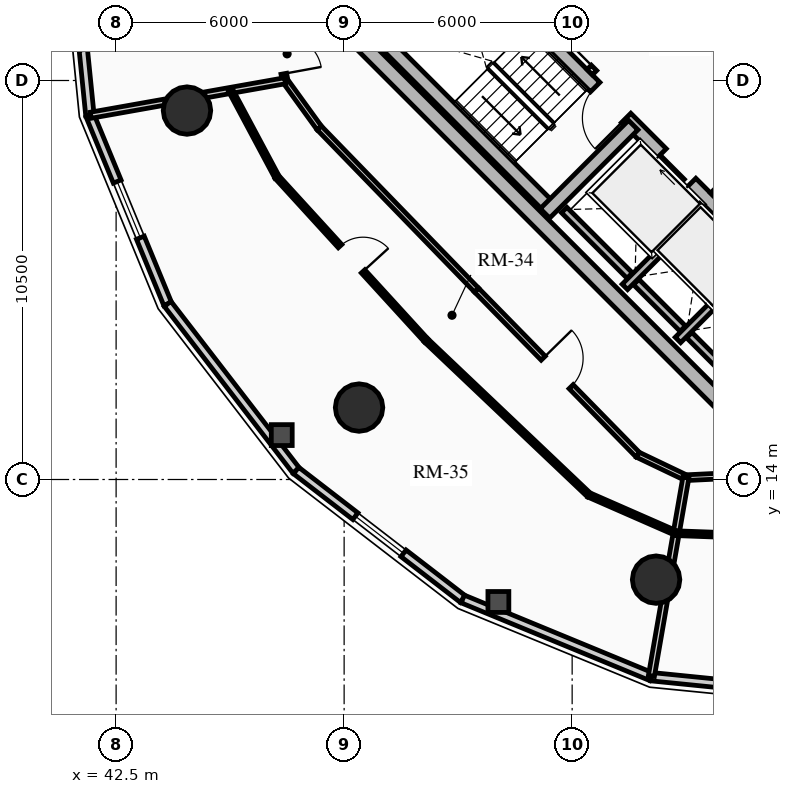
"""IFC4 building model, lengths in metres.
Left out: names, types, materials, properties, quantities, classifications, styles, units other than length and angle.
Written with IfcOpenShell. Run it as: python <this file> out.ifc"""

import sys

from ifc_helpers import new_model, si_unit, direction, frame, frame_2d, origin, origin_2d, place, context, subcontext, project, spatial, rectangle, circle, extrude, source, transform, mapped, element, fill, save


model = new_model("IFC4")
c1 = context("Model", 3, precision=1e-05, world=origin(), true_north=direction((0.0, 1.0)))
c2 = subcontext(c1, "Body", "Model", "MODEL_VIEW")
j1 = project(units=[si_unit("LENGTHUNIT", "METRE"), si_unit("PLANEANGLEUNIT", "RADIAN")], contexts=[c1])
p1 = place(None, origin())
s1 = spatial("IfcSite", under=j1, at=p1, CompositionType="ELEMENT")
p2 = place(p1, origin())
s2 = spatial("IfcBuilding", under=s1, at=p2, CompositionType="ELEMENT")
p3 = place(p2, frame((0.0, 0.0, 166.15)))
s3 = spatial("IfcBuildingStorey", under=s2, at=p3, CompositionType="ELEMENT", Elevation=166.15)
for number, where, z_axis, x_axis in (
    (1, (58.702, 15.732, 0.0), (0.0, 0.0, 1.0), (-0.707, 0.707, 0.0)),
    (2, (66.268, 23.298, 0.0), (0.0, 0.0, 1.0), (-0.707, 0.707, 0.0)),
):
    element("IfcWall", number, at=place(p3, frame(where, z_axis=z_axis, x_axis=x_axis)), inside=s3, PredefinedType="SHEAR", context=c2, shape_type="SweptSolid", body=[
        extrude(rectangle(XDim=14.1, YDim=0.4, at=frame_2d((7.05, 0.0))), origin(), (0.0, 0.0, 1.0), 2.91),
    ])
p4 = place(p3, frame((61.06, 18.373, 0.0), z_axis=(0.0, 0.0, 1.0), x_axis=(-0.707106781187, 0.707106781187, 0.0)))
e3 = element("IfcWall", 3, at=p4, inside=s3, PredefinedType="SHEAR", context=c2, shape_type="SweptSolid", body=[
    extrude(rectangle(XDim=13.7, YDim=0.35, at=frame_2d((6.85, 0.0))), origin(), (0.0, 0.0, 1.0), 2.91),
])
m1 = source(origin(), c2, "Body", "SweptSolid", [
    extrude(rectangle(XDim=1.1, YDim=2.015, at=frame_2d((0.55, 1.007))), frame((0.0, 0.185, 0.0), z_axis=(0.0, -1.0, 0.0), x_axis=(1.0, 0.0, 0.0)), (0.0, 0.0, 1.0), 0.37),
])
p5 = place(p4, frame((4.85, 0.0, 0.0)))
e4 = element("IfcOpeningElement", 4, at=p5, cuts=e3, PredefinedType="OPENING", context=c2, shape_type="MappedRepresentation", body=[
    mapped(m1, transform((0.0, 0.0, 0.0), x_axis=(1.0, 0.0, 0.0), y_axis=(0.0, 1.0, 0.0), z_axis=(0.0, 0.0, 1.0), scale=1.0)),
])
p6 = place(p4, frame((0.625, 0.0, 0.0)))
e5 = element("IfcOpeningElement", 5, at=p6, cuts=e3, PredefinedType="OPENING", context=c2, shape_type="MappedRepresentation", body=[
    mapped(m1, transform((0.0, 0.0, 0.0), x_axis=(1.0, 0.0, 0.0), y_axis=(0.0, 1.0, 0.0), z_axis=(0.0, 0.0, 1.0), scale=1.0)),
])
p7 = place(p4, frame((2.625, 0.0, 0.0)))
e6 = element("IfcOpeningElement", 6, at=p7, cuts=e3, PredefinedType="OPENING", context=c2, shape_type="MappedRepresentation", body=[
    mapped(m1, transform((0.0, 0.0, 0.0), x_axis=(1.0, 0.0, 0.0), y_axis=(0.0, 1.0, 0.0), z_axis=(0.0, 0.0, 1.0), scale=1.0)),
])
m2 = source(origin(), c2, "Body", "SweptSolid", [
    extrude(rectangle(XDim=1.15, YDim=2.02, at=frame_2d((0.575, 1.01))), frame((0.0, 0.185, 0.0), z_axis=(0.0, -1.0, 0.0), x_axis=(1.0, 0.0, 0.0)), (0.0, 0.0, 1.0), 0.37),
])
p8 = place(p4, frame((7.27, 0.0, 0.0)))
e7 = element("IfcOpeningElement", 7, at=p8, cuts=e3, PredefinedType="OPENING", context=c2, shape_type="MappedRepresentation", body=[
    mapped(m2, transform((0.0, 0.0, 0.0), x_axis=(1.0, 0.0, 0.0), y_axis=(0.0, 1.0, 0.0), z_axis=(0.0, 0.0, 1.0), scale=1.0)),
])
p9 = place(p3, frame((63.627, 20.94, 0.0), z_axis=(0.0, 0.0, 1.0), x_axis=(-0.707119496762, 0.707094065383, 0.0)))
e8 = element("IfcWall", 8, at=p9, inside=s3, PredefinedType="SHEAR", context=c2, shape_type="SweptSolid", body=[
    extrude(rectangle(XDim=9.6, YDim=0.35, at=frame_2d((4.8, 0.0))), origin(), (0.0, 0.0, 1.0), 2.91),
])
p10 = place(p9, frame((5.28, 0.0, 0.0)))
e9 = element("IfcOpeningElement", 9, at=p10, cuts=e8, PredefinedType="OPENING", context=c2, shape_type="MappedRepresentation", body=[
    mapped(m2, transform((0.0, 0.0, 0.0), x_axis=(1.0, 0.0, 0.0), y_axis=(0.0, 1.0, 0.0), z_axis=(0.0, 0.0, 1.0), scale=1.0)),
])
p11 = place(p3, frame((53.922, 21.141, 0.0), z_axis=(0.0, 0.0, 1.0), x_axis=(-0.707106781187, 0.707106781187, 0.0)))
e10 = element("IfcWall", 10, at=p11, inside=s3, PredefinedType="SHEAR", context=c2, shape_type="SweptSolid", body=[
    extrude(rectangle(XDim=6.695, YDim=0.35, at=frame_2d((3.348, 0.0))), origin(), (0.0, 0.0, 1.0), 2.91),
])
p12 = place(p3, frame((53.784, 21.003, 0.0), z_axis=(0.0, 0.0, 1.0), x_axis=(0.707106781187, 0.707106781187, 0.0)))
e11 = element("IfcWall", 11, at=p12, inside=s3, PredefinedType="SHEAR", context=c2, shape_type="SweptSolid", body=[
    extrude(rectangle(XDim=3.285, YDim=0.35, at=frame_2d((1.643, 0.0))), origin(), (0.0, 0.0, 1.0), 2.91),
])
for number, where, z_axis, x_axis in (
    (12, (44.365, 23.709, 0.0), (0.0, 0.0, 1.0), (1.0, 0.0, 0.0)),
    (13, (48.893, 15.893, 0.0), (0.0, 0.0, 1.0), (1.0, 0.0, 0.0)),
    (14, (56.709, 11.365, 0.0), (0.0, 0.0, 1.0), (1.0, 0.0, 0.0)),
):
    element("IfcColumn", number, at=place(p3, frame(where, z_axis=z_axis, x_axis=x_axis)), inside=s3, PredefinedType="USERDEFINED", context=c2, shape_type="SweptSolid", body=[
        extrude(circle(Radius=0.625, at=origin_2d()), origin(), (0.0, 0.0, 1.0), 2.91),
    ])
p13 = place(p3, frame((41.811, 23.582, 0.0), z_axis=(0.0, 0.0, 1.0), x_axis=(-0.100279889424, 0.994959267396, 0.0)))
e15 = element("IfcWall", 15, at=p13, inside=s3, PredefinedType="SOLIDWALL", context=c2, shape_type="SweptSolid", body=[
    extrude(rectangle(XDim=5.076, YDim=0.22, at=frame_2d((2.538, 0.0))), origin(), (0.0, 0.0, 1.0), 2.675),
])
m3 = source(origin(), c2, "Body", "SweptSolid", [
    extrude(rectangle(XDim=1.6, YDim=1.3, at=frame_2d((0.8, 0.65))), frame((0.0, 0.12, 0.0), z_axis=(0.0, -1.0, 0.0), x_axis=(1.0, 0.0, 0.0)), (0.0, 0.0, 1.0), 0.24),
])
p14 = place(p13, frame((1.738, 0.0, 0.65)))
e16 = element("IfcOpeningElement", 16, at=p14, cuts=e15, PredefinedType="OPENING", context=c2, shape_type="MappedRepresentation", body=[
    mapped(m3, transform((0.0, 0.0, 0.0), x_axis=(1.0, 0.0, 0.0), y_axis=(0.0, 1.0, 0.0), z_axis=(0.0, 0.0, 1.0), scale=1.0)),
])
p15 = place(p3, frame((43.856, 18.622, 0.0), z_axis=(0.0, 0.0, 1.0), x_axis=(-0.38111364655, 0.924528197738, 0.0)))
e17 = element("IfcWall", 17, at=p15, inside=s3, PredefinedType="SOLIDWALL", context=c2, shape_type="SweptSolid", body=[
    extrude(rectangle(XDim=5.366, YDim=0.22, at=frame_2d((2.683, 0.0))), origin(), (0.0, 0.0, 1.0), 2.675),
])
p16 = place(p15, frame((1.883, 0.0, 0.65)))
e18 = element("IfcOpeningElement", 18, at=p16, cuts=e17, PredefinedType="OPENING", context=c2, shape_type="MappedRepresentation", body=[
    mapped(m3, transform((0.0, 0.0, 0.0), x_axis=(1.0, 0.0, 0.0), y_axis=(0.0, 1.0, 0.0), z_axis=(0.0, 0.0, 1.0), scale=1.0)),
])
p17 = place(p3, frame((47.236, 14.236, 0.0), z_axis=(0.0, 0.0, 1.0), x_axis=(-0.610543584779, 0.791982658323, 0.0)))
e19 = element("IfcWall", 19, at=p17, inside=s3, PredefinedType="SOLIDWALL", context=c2, shape_type="SweptSolid", body=[
    extrude(rectangle(XDim=5.537, YDim=0.22, at=frame_2d((2.769, 0.0))), origin(), (0.0, 0.0, 1.0), 2.675),
])
p18 = place(p3, frame((51.622, 10.856, 0.0), z_axis=(0.0, 0.0, 1.0), x_axis=(-0.791982658323, 0.610543584779, 0.0)))
e20 = element("IfcWall", 20, at=p18, inside=s3, PredefinedType="SOLIDWALL", context=c2, shape_type="SweptSolid", body=[
    extrude(rectangle(XDim=5.537, YDim=0.22, at=frame_2d((2.769, 0.0))), origin(), (0.0, 0.0, 1.0), 2.675),
])
p19 = place(p18, frame((1.968, 0.0, 0.65)))
e21 = element("IfcOpeningElement", 21, at=p19, cuts=e20, PredefinedType="OPENING", context=c2, shape_type="MappedRepresentation", body=[
    mapped(m3, transform((0.0, 0.0, 0.0), x_axis=(1.0, 0.0, 0.0), y_axis=(0.0, 1.0, 0.0), z_axis=(0.0, 0.0, 1.0), scale=1.0)),
])
p20 = place(p3, frame((56.582, 8.811, 0.0), z_axis=(0.0, 0.0, 1.0), x_axis=(-0.924528197738, 0.38111364655, 0.0)))
e22 = element("IfcWall", 22, at=p20, inside=s3, PredefinedType="SOLIDWALL", context=c2, shape_type="SweptSolid", body=[
    extrude(rectangle(XDim=5.366, YDim=0.22, at=frame_2d((2.683, 0.0))), origin(), (0.0, 0.0, 1.0), 2.675),
])
p21 = place(p3, frame((61.633, 8.302, 0.0), z_axis=(0.0, 0.0, 1.0), x_axis=(-0.994959267396, 0.100279889424, 0.0)))
e23 = element("IfcWall", 23, at=p21, inside=s3, PredefinedType="SOLIDWALL", context=c2, shape_type="SweptSolid", body=[
    extrude(rectangle(XDim=5.076, YDim=0.22, at=frame_2d((2.538, 0.0))), origin(), (0.0, 0.0, 1.0), 2.675),
])
p22 = place(p21, frame((1.738, 0.0, 0.65)))
e24 = element("IfcOpeningElement", 24, at=p22, cuts=e23, PredefinedType="OPENING", context=c2, shape_type="MappedRepresentation", body=[
    mapped(m3, transform((0.0, 0.0, 0.0), x_axis=(1.0, 0.0, 0.0), y_axis=(0.0, 1.0, 0.0), z_axis=(0.0, 0.0, 1.0), scale=1.0)),
])
p23 = place(p3, frame((55.888, 19.069, 0.0), z_axis=(0.0, 0.0, 1.0), x_axis=(0.707106781187, 0.707106781187, 0.0)))
e25 = element("IfcWall", 25, at=p23, inside=s3, PredefinedType="SHEAR", context=c2, shape_type="SweptSolid", body=[
    extrude(rectangle(XDim=2.97, YDim=0.2, at=frame_2d((1.485, 0.0))), origin(), (0.0, 0.0, 1.0), 2.91),
])
p24 = place(p3, frame((56.015, 19.366, 0.0), z_axis=(0.0, 0.0, 1.0), x_axis=(-0.707106781187, 0.707106781187, 0.0)))
e26 = element("IfcWall", 26, at=p24, inside=s3, PredefinedType="SHEAR", context=c2, shape_type="SweptSolid", body=[
    extrude(rectangle(XDim=2.44, YDim=0.2, at=frame_2d((1.22, 0.0))), origin(), (0.0, 0.0, 1.0), 2.91),
])
p25 = place(p3, frame((57.284, 17.673, 0.0), z_axis=(0.0, 0.0, 1.0), x_axis=(0.707147878904, 0.70706568108, 0.0)))
e27 = element("IfcWall", 27, at=p25, inside=s3, PredefinedType="SHEAR", context=c2, shape_type="SweptSolid", body=[
    extrude(rectangle(XDim=2.97, YDim=0.2, at=frame_2d((1.485, 0.0))), origin(), (0.0, 0.0, 1.0), 2.91),
])
p26 = place(p3, frame((57.412, 17.97, 0.0), z_axis=(0.0, 0.0, 1.0), x_axis=(-0.707106781187, 0.707106781187, 0.0)))
e28 = element("IfcWall", 28, at=p26, inside=s3, PredefinedType="SHEAR", context=c2, shape_type="SweptSolid", body=[
    extrude(rectangle(XDim=1.735, YDim=0.2, at=frame_2d((0.867, 0.0))), origin(), (0.0, 0.0, 1.0), 2.91),
])
p27 = place(p3, frame((58.737, 16.644, 0.0), z_axis=(0.0, 0.0, 1.0), x_axis=(-0.707032117043, 0.707181437447, 0.0)))
e29 = element("IfcWall", 29, at=p27, inside=s3, PredefinedType="SHEAR", context=c2, shape_type="SweptSolid", body=[
    extrude(rectangle(XDim=1.635, YDim=0.2, at=frame_2d((0.817, 0.0))), origin(), (0.0, 0.0, 1.0), 2.91),
])
p28 = place(p3, frame((58.214, 21.467, 0.0), z_axis=(0.0, 0.0, 1.0), x_axis=(0.707106781187, 0.707106781187, 0.0)))
e30 = element("IfcWall", 30, at=p28, inside=s3, PredefinedType="PARTITIONING", context=c2, shape_type="SweptSolid", body=[
    extrude(rectangle(XDim=3.28, YDim=0.2, at=frame_2d((1.64, 0.0))), origin(), (0.0, 0.0, 1.0), 2.675),
])
m4 = source(origin(), c2, "Body", "SweptSolid", [
    extrude(rectangle(XDim=1.5, YDim=2.02, at=frame_2d((0.75, 1.01))), frame((0.0, 0.11, 0.0), z_axis=(0.0, -1.0, 0.0), x_axis=(1.0, 0.0, 0.0)), (0.0, 0.0, 1.0), 0.22),
])
p29 = place(p28, frame((1.55, 0.0, 0.0)))
e31 = element("IfcOpeningElement", 31, at=p29, cuts=e30, PredefinedType="OPENING", context=c2, shape_type="MappedRepresentation", body=[
    mapped(m4, transform((0.0, 0.0, 0.0), x_axis=(1.0, 0.0, 0.0), y_axis=(0.0, 1.0, 0.0), z_axis=(0.0, 0.0, 1.0), scale=1.0)),
])
p30 = place(p3, frame((54.961, 24.719, 0.0), z_axis=(0.0, 0.0, 1.0), x_axis=(0.707106781187, 0.707106781187, 0.0)))
e32 = element("IfcWall", 32, at=p30, inside=s3, PredefinedType="PARTITIONING", context=c2, shape_type="SweptSolid", body=[
    extrude(rectangle(XDim=3.28, YDim=0.2, at=frame_2d((1.64, 0.0))), origin(), (0.0, 0.0, 1.0), 2.675),
])
m5 = source(origin(), c2, "Body", "SweptSolid", [
    extrude(rectangle(XDim=0.9, YDim=2.005, at=frame_2d((0.45, 1.002))), frame((0.0, 0.11, 0.0), z_axis=(0.0, -1.0, 0.0), x_axis=(1.0, 0.0, 0.0)), (0.0, 0.0, 1.0), 0.22),
])
p31 = place(p30, frame((0.16, 0.0, 0.0)))
e33 = element("IfcOpeningElement", 33, at=p31, cuts=e32, PredefinedType="OPENING", context=c2, shape_type="MappedRepresentation", body=[
    mapped(m5, transform((0.0, 0.0, 0.0), x_axis=(1.0, 0.0, 0.0), y_axis=(0.0, 1.0, 0.0), z_axis=(0.0, 0.0, 1.0), scale=1.0)),
])
p32 = place(p3, frame((46.699, 25.843, 0.0), z_axis=(0.0, 0.0, 1.0), x_axis=(0.180451258011, -0.983583928032, 0.0)))
e34 = element("IfcWall", 34, at=p32, inside=s3, PredefinedType="PARTITIONING", context=c2, shape_type="SweptSolid", body=[
    extrude(rectangle(XDim=1.372, YDim=0.15, at=frame_2d((0.686, 0.0))), origin(), (0.0, 0.0, 1.0), 2.245),
])
m6 = source(origin(), c2, "Body", "SweptSolid", [
    extrude(rectangle(XDim=1.0, YDim=2.015, at=frame_2d((0.5, 1.007))), frame((0.0, 0.085, 0.0), z_axis=(0.0, -1.0, 0.0), x_axis=(1.0, 0.0, 0.0)), (0.0, 0.0, 1.0), 0.17),
])
p33 = place(p32, frame((0.186, 0.0, 0.0)))
e35 = element("IfcOpeningElement", 35, at=p33, cuts=e34, PredefinedType="OPENING", context=c2, shape_type="MappedRepresentation", body=[
    mapped(m6, transform((0.0, 0.0, 0.0), x_axis=(1.0, 0.0, 0.0), y_axis=(0.0, 1.0, 0.0), z_axis=(0.0, 0.0, 1.0), scale=1.0)),
])
p34 = place(p3, frame((46.946, 24.494, 0.0), z_axis=(0.0, 0.0, 1.0), x_axis=(0.586340262528, -0.810064871809, 0.0)))
e36 = element("IfcWall", 36, at=p34, inside=s3, PredefinedType="PARTITIONING", context=c2, shape_type="SweptSolid", body=[
    extrude(rectangle(XDim=1.531, YDim=0.15, at=frame_2d((0.766, 0.0))), origin(), (0.0, 0.0, 1.0), 2.245),
])
p35 = place(p3, frame((47.844, 23.253, 0.0), z_axis=(0.0, 0.0, 1.0), x_axis=(0.696248411352, -0.717800912293, 0.0)))
e37 = element("IfcWall", 37, at=p35, inside=s3, PredefinedType="PARTITIONING", context=c2, shape_type="SweptSolid", body=[
    extrude(rectangle(XDim=5.947, YDim=0.15, at=frame_2d((2.974, 0.0))), origin(), (0.0, 0.0, 1.0), 2.675),
])
p36 = place(p3, frame((51.985, 18.985, 0.0), z_axis=(0.0, 0.0, 1.0), x_axis=(0.699619654291, -0.714515457726, 0.0)))
e38 = element("IfcWall", 38, at=p36, inside=s3, PredefinedType="PARTITIONING", context=c2, shape_type="SweptSolid", body=[
    extrude(rectangle(XDim=6.064, YDim=0.15, at=frame_2d((3.032, 0.0))), origin(), (0.0, 0.0, 1.0), 2.245),
])
m7 = source(origin(), c2, "Body", "SweptSolid", [
    extrude(rectangle(XDim=1.05, YDim=2.015, at=frame_2d((0.525, 1.007))), frame((0.0, 0.085, 0.0), z_axis=(0.0, -1.0, 0.0), x_axis=(1.0, 0.0, 0.0)), (0.0, 0.0, 1.0), 0.17),
])
p37 = place(p36, frame((2.507, 0.0, 0.0)))
e39 = element("IfcOpeningElement", 39, at=p37, cuts=e38, PredefinedType="OPENING", context=c2, shape_type="MappedRepresentation", body=[
    mapped(m7, transform((0.0, 0.0, 0.0), x_axis=(1.0, 0.0, 0.0), y_axis=(0.0, 1.0, 0.0), z_axis=(0.0, 0.0, 1.0), scale=1.0)),
])
p38 = place(p3, frame((56.227, 14.652, 0.0), z_axis=(0.0, 0.0, 1.0), x_axis=(0.902364039563, -0.430974639745, 0.0)))
e40 = element("IfcWall", 40, at=p38, inside=s3, PredefinedType="PARTITIONING", context=c2, shape_type="SweptSolid", body=[
    extrude(rectangle(XDim=1.401, YDim=0.15, at=frame_2d((0.701, 0.0))), origin(), (0.0, 0.0, 1.0), 2.245),
])
p39 = place(p3, frame((57.492, 14.048, 0.0), z_axis=(0.0, 0.0, 1.0), x_axis=(0.99885011351, 0.047942160364, 0.0)))
e41 = element("IfcWall", 41, at=p39, inside=s3, PredefinedType="PARTITIONING", context=c2, shape_type="SweptSolid", body=[
    extrude(rectangle(XDim=1.477, YDim=0.15, at=frame_2d((0.738, 0.0))), origin(), (0.0, 0.0, 1.0), 2.245),
])
p40 = place(p3, frame((46.946, 24.494, 0.0), z_axis=(0.0, 0.0, 1.0), x_axis=(-0.984604227647, -0.174798497988, 0.0)))
e42 = element("IfcWall", 42, at=p40, inside=s3, PredefinedType="PARTITIONING", context=c2, shape_type="SweptSolid", body=[
    extrude(rectangle(XDim=5.196, YDim=0.16, at=frame_2d((2.598, 0.0))), origin(), (0.0, 0.0, 1.0), 2.245),
])
p41 = place(p3, frame((57.492, 14.048, 0.0), z_axis=(0.0, 0.0, 1.0), x_axis=(-0.171191349619, -0.985237799628, 0.0)))
e43 = element("IfcWall", 43, at=p41, inside=s3, PredefinedType="PARTITIONING", context=c2, shape_type="SweptSolid", body=[
    extrude(rectangle(XDim=5.295, YDim=0.16, at=frame_2d((2.647, 0.0))), origin(), (0.0, 0.0, 1.0), 2.245),
])
p42 = place(p3, frame((45.514, 24.239, 0.0), z_axis=(0.0, 0.0, 1.0), x_axis=(0.471225296528, -0.882012879674, 0.0)))
e44 = element("IfcWall", 44, at=p42, inside=s3, PredefinedType="PARTITIONING", context=c2, shape_type="SweptSolid", body=[
    extrude(rectangle(XDim=2.585, YDim=0.125, at=frame_2d((1.292, 0.0))), origin(), (0.0, 0.0, 1.0), 2.245),
])
p43 = place(p3, frame((46.732, 21.959, 0.0), z_axis=(0.0, 0.0, 1.0), x_axis=(0.674328014222, -0.738431939474, 0.0)))
e45 = element("IfcWall", 45, at=p43, inside=s3, PredefinedType="PARTITIONING", context=c2, shape_type="SweptSolid", body=[
    extrude(rectangle(XDim=5.823, YDim=0.125, at=frame_2d((2.912, 0.0))), origin(), (0.0, 0.0, 1.0), 2.675),
])
m8 = source(origin(), c2, "Body", "SweptSolid", [
    extrude(rectangle(XDim=0.9, YDim=2.005, at=frame_2d((0.45, 1.002))), frame((0.0, 0.073, 0.0), z_axis=(0.0, -1.0, 0.0), x_axis=(1.0, 0.0, 0.0)), (0.0, 0.0, 1.0), 0.145),
])
p44 = place(p43, frame((2.462, 0.0, 0.0)))
e46 = element("IfcOpeningElement", 46, at=p44, cuts=e45, PredefinedType="OPENING", context=c2, shape_type="MappedRepresentation", body=[
    mapped(m8, transform((0.0, 0.0, 0.0), x_axis=(1.0, 0.0, 0.0), y_axis=(0.0, 1.0, 0.0), z_axis=(0.0, 0.0, 1.0), scale=1.0)),
])
p45 = place(p3, frame((50.659, 17.659, 0.0), z_axis=(0.0, 0.0, 1.0), x_axis=(0.72516873678, -0.688571204159, 0.0)))
e47 = element("IfcWall", 47, at=p45, inside=s3, PredefinedType="PARTITIONING", context=c2, shape_type="SweptSolid", body=[
    extrude(rectangle(XDim=5.904, YDim=0.125, at=frame_2d((2.952, 0.0))), origin(), (0.0, 0.0, 1.0), 2.245),
])
p46 = place(p3, frame((54.94, 13.594, 0.0), z_axis=(0.0, 0.0, 1.0), x_axis=(0.915898070967, -0.401410916143, 0.0)))
e48 = element("IfcWall", 48, at=p46, inside=s3, PredefinedType="PARTITIONING", context=c2, shape_type="SweptSolid", body=[
    extrude(rectangle(XDim=2.509, YDim=0.125, at=frame_2d((1.254, 0.0))), origin(), (0.0, 0.0, 1.0), 2.245),
])
p47 = place(p3, frame((57.238, 12.587, 0.0), z_axis=(0.0, 0.0, 1.0), x_axis=(0.999316318576, -0.036971548882, 0.0)))
e49 = element("IfcWall", 49, at=p47, inside=s3, PredefinedType="PARTITIONING", context=c2, shape_type="SweptSolid", body=[
    extrude(rectangle(XDim=2.476, YDim=0.125, at=frame_2d((1.238, 0.0))), origin(), (0.0, 0.0, 1.0), 2.245),
])
m9 = source(origin(), c2, "Body", "SweptSolid", [
    extrude(rectangle(XDim=1.6, YDim=1.3, at=frame_2d((0.8, 0.65))), frame((0.0, 0.03, 0.0), z_axis=(0.0, -1.0, 0.0), x_axis=(1.0, 0.0, 0.0)), (0.0, 0.0, 1.0), 0.06),
])
p48 = place(p16, origin())
e50 = element("IfcWindow", 50, at=p48, inside=s3, PartitioningType="SINGLE_PANEL", PredefinedType="WINDOW", context=c2, shape_type="MappedRepresentation", body=[
    mapped(m9, transform((0.0, 0.0, 0.0), x_axis=(1.0, 0.0, 0.0), y_axis=(0.0, 1.0, 0.0), z_axis=(0.0, 0.0, 1.0), scale=1.0)),
])
fill(e18, e50)
p49 = place(p19, origin())
e51 = element("IfcWindow", 51, at=p49, inside=s3, PartitioningType="SINGLE_PANEL", PredefinedType="WINDOW", context=c2, shape_type="MappedRepresentation", body=[
    mapped(m9, transform((0.0, 0.0, 0.0), x_axis=(1.0, 0.0, 0.0), y_axis=(0.0, 1.0, 0.0), z_axis=(0.0, 0.0, 1.0), scale=1.0)),
])
fill(e21, e51)
m10 = source(origin(), c2, "Body", "SweptSolid", [
    extrude(rectangle(XDim=1.1, YDim=2.015, at=frame_2d((0.55, 1.007))), frame((0.0, 0.025, 0.0), z_axis=(0.0, -1.0, 0.0), x_axis=(1.0, 0.0, 0.0)), (0.0, 0.0, 1.0), 0.05),
])
p50 = place(p5, origin())
e52 = element("IfcDoor", 52, at=p50, inside=s3, OperationType="SLIDING_TO_RIGHT", PredefinedType="DOOR", context=c2, shape_type="MappedRepresentation", body=[
    mapped(m10, transform((0.0, 0.0, 0.0), x_axis=(1.0, 0.0, 0.0), y_axis=(0.0, 1.0, 0.0), z_axis=(0.0, 0.0, 1.0), scale=1.0)),
])
fill(e4, e52)
m11 = source(origin(), c2, "Body", "SweptSolid", [
    extrude(rectangle(XDim=1.15, YDim=2.02, at=frame_2d((0.575, 1.01))), frame((0.0, 0.025, 0.0), z_axis=(0.0, -1.0, 0.0), x_axis=(1.0, 0.0, 0.0)), (0.0, 0.0, 1.0), 0.05),
])
p51 = place(p8, origin())
e53 = element("IfcDoor", 53, at=p51, inside=s3, OperationType="SINGLE_SWING_LEFT", PredefinedType="DOOR", context=c2, shape_type="MappedRepresentation", body=[
    mapped(m11, transform((0.0, 0.0, 0.0), x_axis=(1.0, 0.0, 0.0), y_axis=(0.0, 1.0, 0.0), z_axis=(0.0, 0.0, 1.0), scale=1.0)),
])
fill(e7, e53)
m12 = source(origin(), c2, "Body", "SweptSolid", [
    extrude(rectangle(XDim=0.9, YDim=2.005, at=frame_2d((0.45, 1.002))), frame((0.0, 0.025, 0.0), z_axis=(0.0, -1.0, 0.0), x_axis=(1.0, 0.0, 0.0)), (0.0, 0.0, 1.0), 0.05),
])
p52 = place(p31, origin())
e54 = element("IfcDoor", 54, at=p52, inside=s3, OperationType="SINGLE_SWING_LEFT", PredefinedType="DOOR", context=c2, shape_type="MappedRepresentation", body=[
    mapped(m12, transform((0.0, 0.0, 0.0), x_axis=(1.0, 0.0, 0.0), y_axis=(0.0, 1.0, 0.0), z_axis=(0.0, 0.0, 1.0), scale=1.0)),
])
fill(e33, e54)
m13 = source(origin(), c2, "Body", "SweptSolid", [
    extrude(rectangle(XDim=1.0, YDim=2.015, at=frame_2d((0.5, 1.007))), frame((0.0, 0.025, 0.0), z_axis=(0.0, -1.0, 0.0), x_axis=(1.0, 0.0, 0.0)), (0.0, 0.0, 1.0), 0.05),
])
p53 = place(p33, origin())
e55 = element("IfcDoor", 55, at=p53, inside=s3, OperationType="SINGLE_SWING_RIGHT", PredefinedType="DOOR", context=c2, shape_type="MappedRepresentation", body=[
    mapped(m13, transform((0.0, 0.0, 0.0), x_axis=(1.0, 0.0, 0.0), y_axis=(0.0, 1.0, 0.0), z_axis=(0.0, 0.0, 1.0), scale=1.0)),
])
fill(e35, e55)
m14 = source(origin(), c2, "Body", "SweptSolid", [
    extrude(rectangle(XDim=1.05, YDim=2.015, at=frame_2d((0.525, 1.007))), frame((0.0, 0.025, 0.0), z_axis=(0.0, -1.0, 0.0), x_axis=(1.0, 0.0, 0.0)), (0.0, 0.0, 1.0), 0.05),
])
p54 = place(p37, origin())
e56 = element("IfcDoor", 56, at=p54, inside=s3, OperationType="SINGLE_SWING_LEFT", PredefinedType="DOOR", context=c2, shape_type="MappedRepresentation", body=[
    mapped(m14, transform((0.0, 0.0, 0.0), x_axis=(1.0, 0.0, 0.0), y_axis=(0.0, 1.0, 0.0), z_axis=(0.0, 0.0, 1.0), scale=1.0)),
])
fill(e39, e56)
p55 = place(p44, origin())
e57 = element("IfcDoor", 57, at=p55, inside=s3, OperationType="SINGLE_SWING_RIGHT", PredefinedType="DOOR", context=c2, shape_type="MappedRepresentation", body=[
    mapped(m12, transform((0.0, 0.0, 0.0), x_axis=(1.0, 0.0, 0.0), y_axis=(0.0, 1.0, 0.0), z_axis=(0.0, 0.0, 1.0), scale=1.0)),
])
fill(e46, e57)
save(model, sys.argv[1])
